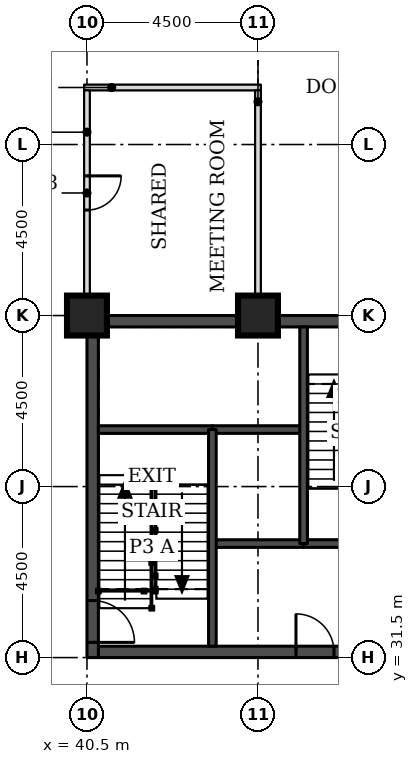
"""IFC4 building model, lengths in metres.
Left out: names, types, materials, properties, quantities, classifications, styles, units other than length and angle.
Written with IfcOpenShell. Run it as: python <this file> out.ifc"""

import sys

from ifc_helpers import new_model, si_unit, direction, frame, frame_2d, origin, origin_2d, place, context, subcontext, project, spatial, rectangle, extrude, element, fill, save


model = new_model("IFC4")
c1 = context("Model", 3, precision=1e-05, world=origin(), true_north=direction((0.0, 1.0)))
c2 = subcontext(c1, "Body", "Model", "MODEL_VIEW")
j1 = project(units=[si_unit("LENGTHUNIT", "METRE"), si_unit("PLANEANGLEUNIT", "RADIAN")], contexts=[c1])
p1 = place(None, origin())
s1 = spatial("IfcSite", under=j1, at=p1, CompositionType="ELEMENT")
p2 = place(p1, origin())
s2 = spatial("IfcBuilding", under=s1, at=p2, CompositionType="ELEMENT")
p3 = place(p2, frame((0.0, 0.0, 112.2)))
s3 = spatial("IfcBuildingStorey", under=s2, at=p3, CompositionType="ELEMENT", Elevation=112.2)
for number, where, z_axis, x_axis in (
    (1, (40.5, 40.5, 0.0), (0.0, 0.0, 1.0), (1.0, 0.0, 0.0)),
    (2, (45.0, 40.5, 0.0), (0.0, 0.0, 1.0), (1.0, 0.0, 0.0)),
):
    element("IfcColumn", number, at=place(p3, frame(where, z_axis=z_axis, x_axis=x_axis)), inside=s3, PredefinedType="COLUMN", context=c2, shape_type="SweptSolid", body=[
        extrude(rectangle(XDim=1.05, YDim=1.05, at=origin_2d()), origin(), (0.0, 0.0, 1.0), 3.7),
    ])
p4 = place(p3, frame((40.8, 31.65, 0.0), z_axis=(0.0, 0.0, 1.0), x_axis=(1.0, 0.0, 0.0)))
e3 = element("IfcWall", 3, at=p4, inside=s3, PredefinedType="SHEAR", context=c2, shape_type="SweptSolid", body=[
    extrude(rectangle(XDim=8.4, YDim=0.3, at=frame_2d((4.2, 0.0))), origin(), (0.0, 0.0, 1.0), 3.7),
])
p5 = place(p4, frame((5.2, 0.0, 0.0)))
e4 = element("IfcOpeningElement", 4, at=p5, cuts=e3, PredefinedType="OPENING", context=c2, shape_type="SweptSolid", body=[
    extrude(rectangle(XDim=1.0, YDim=2.1, at=frame_2d((0.5, 1.05))), frame((0.0, 0.16, 0.0), z_axis=(0.0, -1.0, 0.0), x_axis=(1.0, 0.0, 0.0)), (0.0, 0.0, 1.0), 0.32),
])
p6 = place(p3, frame((40.8, 40.35, 0.0), z_axis=(0.0, 0.0, 1.0), x_axis=(1.0, 0.0, 0.0)))
e5 = element("IfcWall", 5, at=p6, inside=s3, PredefinedType="SHEAR", context=c2, shape_type="SweptSolid", body=[
    extrude(rectangle(XDim=8.4, YDim=0.3, at=frame_2d((4.2, 0.0))), origin(), (0.0, 0.0, 1.0), 3.7),
])
p7 = place(p6, frame((6.4, 0.0, 0.0)))
e6 = element("IfcOpeningElement", 6, at=p7, cuts=e5, PredefinedType="OPENING", context=c2, shape_type="SweptSolid", body=[
    extrude(rectangle(XDim=1.1, YDim=2.1, at=frame_2d((0.55, 1.05))), frame((0.0, 0.16, 0.0), z_axis=(0.0, -1.0, 0.0), x_axis=(1.0, 0.0, 0.0)), (0.0, 0.0, 1.0), 0.32),
])
p8 = place(p3, frame((40.65, 31.5, 0.0), z_axis=(0.0, 0.0, 1.0), x_axis=(0.0, 1.0, 0.0)))
e7 = element("IfcWall", 7, at=p8, inside=s3, PredefinedType="SHEAR", context=c2, shape_type="SweptSolid", body=[
    extrude(rectangle(XDim=9.0, YDim=0.3, at=frame_2d((4.5, 0.0))), origin(), (0.0, 0.0, 1.0), 3.7),
])
p9 = place(p8, frame((0.4, 0.0, 0.0)))
e8 = element("IfcOpeningElement", 8, at=p9, cuts=e7, PredefinedType="OPENING", context=c2, shape_type="SweptSolid", body=[
    extrude(rectangle(XDim=1.1, YDim=2.1, at=frame_2d((0.55, 1.05))), frame((0.0, 0.16, 0.0), z_axis=(0.0, -1.0, 0.0), x_axis=(1.0, 0.0, 0.0)), (0.0, 0.0, 1.0), 0.32),
])
p10 = place(p3, frame((40.425, 46.5, 0.0), z_axis=(0.0, 0.0, 1.0), x_axis=(1.0, 0.0, 0.0)))
e9 = element("IfcWall", 9, at=p10, inside=s3, PredefinedType="PARTITIONING", context=c2, shape_type="SweptSolid", body=[
    extrude(rectangle(XDim=4.65, YDim=0.15, at=frame_2d((2.325, 0.0))), origin(), (0.0, 0.0, 1.0), 3.55),
])
p11 = place(p3, frame((40.5, 41.025, 0.0), z_axis=(0.0, 0.0, 1.0), x_axis=(0.0, 1.0, 0.0)))
e10 = element("IfcWall", 10, at=p11, inside=s3, PredefinedType="PARTITIONING", context=c2, shape_type="SweptSolid", body=[
    extrude(rectangle(XDim=5.4, YDim=0.15, at=frame_2d((2.7, 0.0))), origin(), (0.0, 0.0, 1.0), 3.55),
])
p12 = place(p11, frame((2.25, 0.0, 0.0)))
e11 = element("IfcOpeningElement", 11, at=p12, cuts=e10, PredefinedType="OPENING", context=c2, shape_type="SweptSolid", body=[
    extrude(rectangle(XDim=0.9, YDim=2.1, at=frame_2d((0.45, 1.05))), frame((0.0, 0.085, 0.0), z_axis=(0.0, -1.0, 0.0), x_axis=(1.0, 0.0, 0.0)), (0.0, 0.0, 1.0), 0.17),
])
p13 = place(p3, frame((45.0, 41.025, 0.0), z_axis=(0.0, 0.0, 1.0), x_axis=(0.0, 1.0, 0.0)))
e12 = element("IfcWall", 12, at=p13, inside=s3, PredefinedType="PARTITIONING", context=c2, shape_type="SweptSolid", body=[
    extrude(rectangle(XDim=5.4, YDim=0.15, at=frame_2d((2.7, 0.0))), origin(), (0.0, 0.0, 1.0), 3.55),
])
p14 = place(p3, frame((43.8, 34.5, 0.0), z_axis=(0.0, 0.0, 1.0), x_axis=(1.0, 0.0, 0.0)))
e13 = element("IfcWall", 13, at=p14, inside=s3, PredefinedType="SOLIDWALL", context=c2, shape_type="SweptSolid", body=[
    extrude(rectangle(XDim=2.4, YDim=0.2, at=frame_2d((1.2, 0.0))), origin(), (0.0, 0.0, 1.0), 3.55),
])
p15 = place(p3, frame((46.2, 34.5, 0.0), z_axis=(0.0, 0.0, 1.0), x_axis=(1.0, 0.0, 0.0)))
e14 = element("IfcWall", 14, at=p15, inside=s3, PredefinedType="SOLIDWALL", context=c2, shape_type="SweptSolid", body=[
    extrude(rectangle(XDim=3.0, YDim=0.2, at=frame_2d((1.5, 0.0))), origin(), (0.0, 0.0, 1.0), 3.55),
])
p16 = place(p3, frame((43.8, 37.5, 0.0), z_axis=(0.0, 0.0, 1.0), x_axis=(1.0, 0.0, 0.0)))
e15 = element("IfcWall", 15, at=p16, inside=s3, PredefinedType="SOLIDWALL", context=c2, shape_type="SweptSolid", body=[
    extrude(rectangle(XDim=2.4, YDim=0.2, at=frame_2d((1.2, 0.0))), origin(), (0.0, 0.0, 1.0), 3.7),
])
p17 = place(p3, frame((40.8, 37.5, 0.0), z_axis=(0.0, 0.0, 1.0), x_axis=(1.0, 0.0, 0.0)))
e16 = element("IfcWall", 16, at=p17, inside=s3, PredefinedType="SOLIDWALL", context=c2, shape_type="SweptSolid", body=[
    extrude(rectangle(XDim=3.0, YDim=0.2, at=frame_2d((1.5, 0.0))), origin(), (0.0, 0.0, 1.0), 3.55),
])
for number, where, z_axis, x_axis in (
    (17, (43.8, 31.8, 0.0), (0.0, 0.0, 1.0), (0.0, 1.0, 0.0)),
    (18, (46.2, 34.5, 0.0), (0.0, 0.0, 1.0), (0.0, 1.0, 0.0)),
):
    element("IfcWall", number, at=place(p3, frame(where, z_axis=z_axis, x_axis=x_axis)), inside=s3, PredefinedType="SOLIDWALL", context=c2, shape_type="SweptSolid", body=[
        extrude(rectangle(XDim=5.7, YDim=0.2, at=frame_2d((2.85, 0.0))), origin(), (0.0, 0.0, 1.0), 3.55),
    ])
p18 = place(p12, frame((0.9, 0.0, 0.0), z_axis=(0.0, 0.0, 1.0), x_axis=(-1.0, 0.0, 0.0)))
e19 = element("IfcDoor", 19, at=p18, inside=s3, OperationType="SINGLE_SWING_LEFT", PredefinedType="DOOR", context=c2, shape_type="SweptSolid", body=[
    extrude(rectangle(XDim=0.9, YDim=2.1, at=frame_2d((0.45, 1.05))), frame((0.0, 0.025, 0.0), z_axis=(0.0, -1.0, 0.0), x_axis=(1.0, 0.0, 0.0)), (0.0, 0.0, 1.0), 0.05),
])
fill(e11, e19)
p19 = place(p9, frame((1.1, 0.0, 0.0), z_axis=(0.0, 0.0, 1.0), x_axis=(-1.0, 0.0, 0.0)))
e20 = element("IfcDoor", 20, at=p19, inside=s3, OperationType="SINGLE_SWING_RIGHT", PredefinedType="DOOR", context=c2, shape_type="SweptSolid", body=[
    extrude(rectangle(XDim=1.1, YDim=2.1, at=frame_2d((0.55, 1.05))), frame((0.0, 0.025, 0.0), z_axis=(0.0, -1.0, 0.0), x_axis=(1.0, 0.0, 0.0)), (0.0, 0.0, 1.0), 0.05),
])
fill(e8, e20)
p20 = place(p5, origin())
e21 = element("IfcDoor", 21, at=p20, inside=s3, OperationType="SINGLE_SWING_LEFT", PredefinedType="DOOR", context=c2, shape_type="SweptSolid", body=[
    extrude(rectangle(XDim=1.0, YDim=2.1, at=frame_2d((0.5, 1.05))), frame((0.0, 0.025, 0.0), z_axis=(0.0, -1.0, 0.0), x_axis=(1.0, 0.0, 0.0)), (0.0, 0.0, 1.0), 0.05),
])
fill(e4, e21)
save(model, sys.argv[1])
